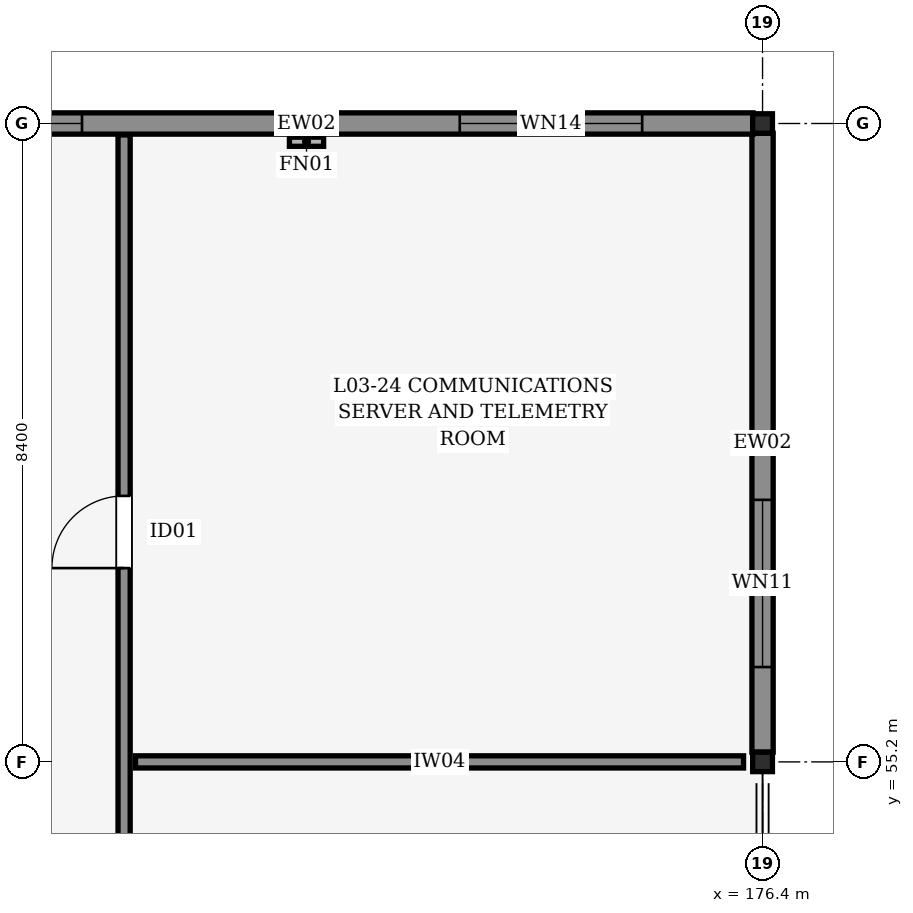
"""IFC4 building model, lengths in metres.
Left out: names, types, materials, properties, quantities, classifications, styles, units other than length and angle.
Written with IfcOpenShell. Run it as: python <this file> out.ifc"""

import sys

from ifc_helpers import new_model, si_unit, direction, frame, frame_2d, origin, origin_2d, place, context, subcontext, project, spatial, rectangle, i_section, extrude, element, fill, save


model = new_model("IFC4")
c1 = context("Model", 3, precision=1e-05, world=origin(), true_north=direction((0.0, 1.0)))
c2 = subcontext(c1, "Body", "Model", "MODEL_VIEW")
j1 = project(units=[si_unit("LENGTHUNIT", "METRE"), si_unit("PLANEANGLEUNIT", "RADIAN")], contexts=[c1])
p1 = place(None, origin())
s1 = spatial("IfcSite", under=j1, at=p1, CompositionType="ELEMENT")
p2 = place(p1, origin())
s2 = spatial("IfcBuilding", under=s1, at=p2, CompositionType="ELEMENT")
p3 = place(p2, frame((0.0, 0.0, 12.6)))
s3 = spatial("IfcBuildingStorey", under=s2, at=p3, CompositionType="ELEMENT", Elevation=12.6)
for number, where, z_axis, x_axis in (
    (1, (176.4, 55.2, 0.0), (0.0, 0.0, 1.0), (1.0, 0.0, 0.0)),
    (2, (176.4, 63.6, 0.0), (0.0, 0.0, 1.0), (1.0, 0.0, 0.0)),
):
    element("IfcColumn", number, at=place(p3, frame(where, z_axis=z_axis, x_axis=x_axis)), inside=s3, PredefinedType="COLUMN", context=c2, shape_type="SweptSolid", body=[
        extrude(i_section(OverallWidth=0.256, OverallDepth=0.26, WebThickness=0.01, FlangeThickness=0.017, FilletRadius=0.013, at=origin_2d()), origin(), (0.0, 0.0, 1.0), 3.6),
    ])
p4 = place(p3, frame((176.4, 55.328, 0.0), z_axis=(0.0, 0.0, 1.0), x_axis=(0.0, 1.0, 0.0)))
e3 = element("IfcWall", 3, at=p4, inside=s3, PredefinedType="STANDARD", context=c2, shape_type="SweptSolid", body=[
    extrude(rectangle(XDim=8.144, YDim=0.28, at=frame_2d((4.072, 0.0))), origin(), (0.0, 0.0, 1.0), 2.535),
])
p5 = place(p4, frame((1.12, 0.0, 0.65)))
e4 = element("IfcOpeningElement", 4, at=p5, cuts=e3, PredefinedType="OPENING", context=c2, shape_type="SweptSolid", body=[
    extrude(rectangle(XDim=2.2, YDim=1.6, at=frame_2d((1.1, 0.8))), frame((0.0, 0.15, 0.0), z_axis=(0.0, -1.0, 0.0), x_axis=(1.0, 0.0, 0.0)), (0.0, 0.0, 1.0), 0.3),
])
p6 = place(p3, frame((164.526, 63.6, 0.0), z_axis=(0.0, 0.0, 1.0), x_axis=(1.0, 0.0, 0.0)))
e5 = element("IfcWall", 5, at=p6, inside=s3, PredefinedType="STANDARD", context=c2, shape_type="SweptSolid", body=[
    extrude(rectangle(XDim=11.748, YDim=0.28, at=frame_2d((5.874, 0.0))), origin(), (0.0, 0.0, 1.0), 2.535),
])
p7 = place(p6, frame((1.12, 0.0, 0.65)))
e6 = element("IfcOpeningElement", 6, at=p7, cuts=e5, PredefinedType="OPENING", context=c2, shape_type="SweptSolid", body=[
    extrude(rectangle(XDim=1.8, YDim=1.5, at=frame_2d((0.9, 0.75))), frame((0.0, 0.15, 0.0), z_axis=(0.0, -1.0, 0.0), x_axis=(1.0, 0.0, 0.0)), (0.0, 0.0, 1.0), 0.3),
])
p8 = place(p6, frame((7.89, 0.0, 0.65)))
e7 = element("IfcOpeningElement", 7, at=p8, cuts=e5, PredefinedType="OPENING", context=c2, shape_type="SweptSolid", body=[
    extrude(rectangle(XDim=2.4, YDim=1.5, at=frame_2d((1.2, 0.75))), frame((0.0, 0.15, 0.0), z_axis=(0.0, -1.0, 0.0), x_axis=(1.0, 0.0, 0.0)), (0.0, 0.0, 1.0), 0.3),
])
p9 = place(p3, frame((168.0, 21.75, 0.0), z_axis=(0.0, 0.0, 1.0), x_axis=(0.0, 1.0, 0.0)))
e8 = element("IfcWall", 8, at=p9, inside=s3, PredefinedType="PARTITIONING", context=c2, shape_type="SweptSolid", body=[
    extrude(rectangle(XDim=41.7, YDim=0.16, at=frame_2d((20.85, 0.0))), origin(), (0.0, 0.0, 1.0), 2.525),
])
p10 = place(p9, frame((8.0, 0.0, 0.0)))
e9 = element("IfcOpeningElement", 9, at=p10, cuts=e8, PredefinedType="OPENING", context=c2, shape_type="SweptSolid", body=[
    extrude(rectangle(XDim=0.95, YDim=2.1, at=frame_2d((0.475, 1.05))), frame((0.0, 0.09, 0.0), z_axis=(0.0, -1.0, 0.0), x_axis=(1.0, 0.0, 0.0)), (0.0, 0.0, 1.0), 0.18),
])
p11 = place(p9, frame((20.0, 0.0, 0.0)))
e10 = element("IfcOpeningElement", 10, at=p11, cuts=e8, PredefinedType="OPENING", context=c2, shape_type="SweptSolid", body=[
    extrude(rectangle(XDim=0.95, YDim=2.1, at=frame_2d((0.475, 1.05))), frame((0.0, 0.09, 0.0), z_axis=(0.0, -1.0, 0.0), x_axis=(1.0, 0.0, 0.0)), (0.0, 0.0, 1.0), 0.18),
])
p12 = place(p9, frame((36.0, 0.0, 0.0)))
e11 = element("IfcOpeningElement", 11, at=p12, cuts=e8, PredefinedType="OPENING", context=c2, shape_type="SweptSolid", body=[
    extrude(rectangle(XDim=0.95, YDim=2.1, at=frame_2d((0.475, 1.05))), frame((0.0, 0.09, 0.0), z_axis=(0.0, -1.0, 0.0), x_axis=(1.0, 0.0, 0.0)), (0.0, 0.0, 1.0), 0.18),
])
p13 = place(p3, frame((168.15, 55.2, 0.0), z_axis=(0.0, 0.0, 1.0), x_axis=(1.0, 0.0, 0.0)))
e12 = element("IfcWall", 12, at=p13, inside=s3, PredefinedType="PARTITIONING", context=c2, shape_type="SweptSolid", body=[
    extrude(rectangle(XDim=8.0, YDim=0.16, at=frame_2d((4.0, 0.0))), origin(), (0.0, 0.0, 1.0), 2.525),
])
p14 = place(p5, origin())
e13 = element("IfcWindow", 13, at=p14, inside=s3, PartitioningType="SINGLE_PANEL", PredefinedType="WINDOW", context=c2, shape_type="SweptSolid", body=[
    extrude(rectangle(XDim=2.2, YDim=1.6, at=frame_2d((1.1, 0.8))), frame((0.0, 0.03, 0.0), z_axis=(0.0, -1.0, 0.0), x_axis=(1.0, 0.0, 0.0)), (0.0, 0.0, 1.0), 0.06),
])
fill(e4, e13)
p15 = place(p7, origin())
e14 = element("IfcWindow", 14, at=p15, inside=s3, PartitioningType="SINGLE_PANEL", PredefinedType="WINDOW", context=c2, shape_type="SweptSolid", body=[
    extrude(rectangle(XDim=1.8, YDim=1.5, at=frame_2d((0.9, 0.75))), frame((0.0, 0.03, 0.0), z_axis=(0.0, -1.0, 0.0), x_axis=(1.0, 0.0, 0.0)), (0.0, 0.0, 1.0), 0.06),
])
fill(e6, e14)
p16 = place(p8, origin())
e15 = element("IfcWindow", 15, at=p16, inside=s3, PartitioningType="SINGLE_PANEL", PredefinedType="WINDOW", context=c2, shape_type="SweptSolid", body=[
    extrude(rectangle(XDim=2.4, YDim=1.5, at=frame_2d((1.2, 0.75))), frame((0.0, 0.03, 0.0), z_axis=(0.0, -1.0, 0.0), x_axis=(1.0, 0.0, 0.0)), (0.0, 0.0, 1.0), 0.06),
])
fill(e7, e15)
p17 = place(p12, origin())
e16 = element("IfcDoor", 16, at=p17, inside=s3, OperationType="SINGLE_SWING_LEFT", PredefinedType="DOOR", context=c2, shape_type="SweptSolid", body=[
    extrude(rectangle(XDim=0.95, YDim=2.1, at=frame_2d((0.475, 1.05))), frame((0.0, 0.025, 0.0), z_axis=(0.0, -1.0, 0.0), x_axis=(1.0, 0.0, 0.0)), (0.0, 0.0, 1.0), 0.05),
])
fill(e11, e16)
save(model, sys.argv[1])
